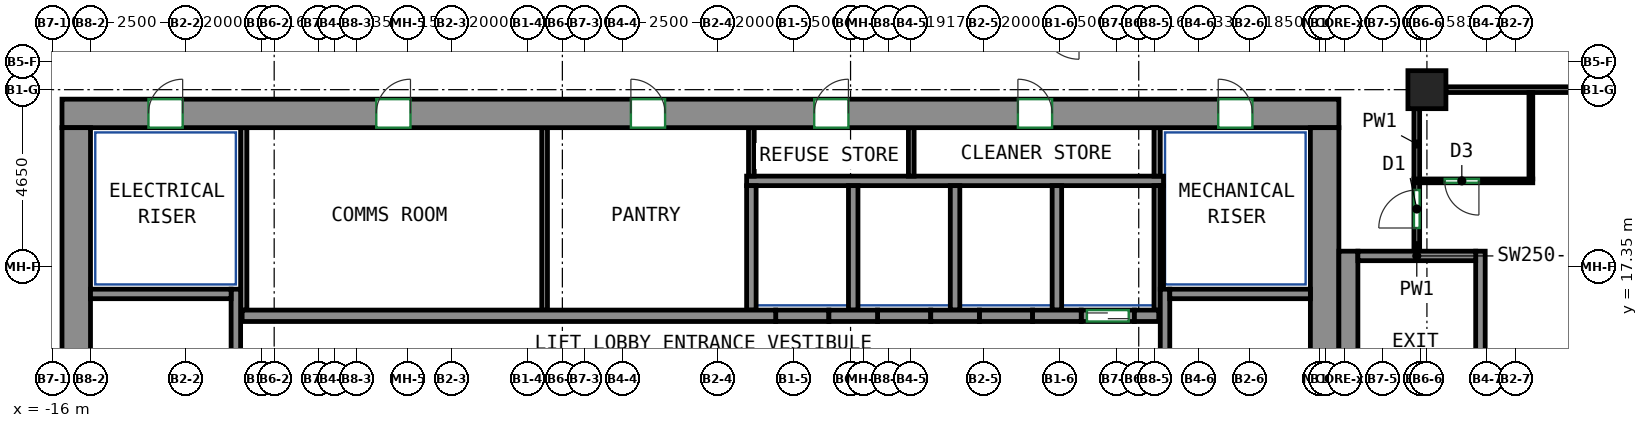
"""IFC4 building model, lengths in metres.
Left out: names, types, materials, properties, quantities, classifications, styles, units other than length and angle.
Written with IfcOpenShell. Run it as: python <this file> out.ifc"""

import sys

from ifc_helpers import new_model, si_unit, direction, frame, frame_2d, origin, origin_2d, place, context, subcontext, project, spatial, rectangle, extrude, source, transform, mapped, element, fill, save


model = new_model("IFC4")
c1 = context("Model", 3, precision=1e-05, world=origin(), true_north=direction((0.0, 1.0)))
c2 = subcontext(c1, "Body", "Model", "MODEL_VIEW")
j1 = project(units=[si_unit("LENGTHUNIT", "METRE"), si_unit("PLANEANGLEUNIT", "RADIAN")], contexts=[c1])
p1 = place(None, origin())
s1 = spatial("IfcSite", under=j1, at=p1, CompositionType="ELEMENT")
p2 = place(p1, origin())
s2 = spatial("IfcBuilding", under=s1, at=p2, CompositionType="ELEMENT")
p3 = place(p2, frame((0.0, 0.0, 210.1)))
s3 = spatial("IfcBuildingStorey", under=s2, at=p3, CompositionType="ELEMENT", Elevation=210.1)
m1 = source(origin(), c2, "Body", "SweptSolid", [
    extrude(rectangle(XDim=1.0, YDim=1.0, at=origin_2d()), origin(), (0.0, 0.0, 1.0), 3.12),
])
p4 = place(p3, frame((20.167, 22.0, 0.0), z_axis=(0.0, 0.0, 1.0), x_axis=(1.0, 0.0, 0.0)))
e1 = element("IfcColumn", 1, at=p4, inside=s3, PredefinedType="COLUMN", context=c2, shape_type="MappedRepresentation", body=[
    mapped(m1, transform((0.0, 0.0, 0.0))),
])
m2 = source(origin(), c2, "Body", "SweptSolid", [
    extrude(rectangle(XDim=33.6, YDim=0.75, at=frame_2d((16.8, 0.0))), origin(), (0.0, 0.0, 1.0), 3.12),
])
p5 = place(p3, frame((-15.75, 21.375, 0.0), z_axis=(0.0, 0.0, 1.0), x_axis=(1.0, 0.0, 0.0)))
e2 = element("IfcWall", 2, at=p5, inside=s3, PredefinedType="SHEAR", context=c2, shape_type="MappedRepresentation", body=[
    mapped(m2, transform((0.0, 0.0, 0.0))),
])
p6 = place(p5, frame((8.27, 0.0, 0.0)))
e3 = element("IfcOpeningElement", 3, at=p6, cuts=e2, PredefinedType="OPENING", context=c2, shape_type="SweptSolid", body=[
    extrude(rectangle(XDim=0.9, YDim=2.1, at=frame_2d((0.45, 1.05))), frame((0.0, 0.385, 0.0), z_axis=(0.0, -1.0, 0.0), x_axis=(1.0, 0.0, 0.0)), (0.0, 0.0, 1.0), 0.77),
])
p7 = place(p5, frame((14.97, 0.0, 0.0)))
e4 = element("IfcOpeningElement", 4, at=p7, cuts=e2, PredefinedType="OPENING", context=c2, shape_type="SweptSolid", body=[
    extrude(rectangle(XDim=0.9, YDim=2.1, at=frame_2d((0.45, 1.05))), frame((0.0, 0.385, 0.0), z_axis=(0.0, -1.0, 0.0), x_axis=(1.0, 0.0, 0.0)), (0.0, 0.0, 1.0), 0.77),
])
p8 = place(p5, frame((19.794, 0.0, 0.0)))
e5 = element("IfcOpeningElement", 5, at=p8, cuts=e2, PredefinedType="OPENING", context=c2, shape_type="SweptSolid", body=[
    extrude(rectangle(XDim=0.9, YDim=2.1, at=frame_2d((0.45, 1.05))), frame((0.0, 0.385, 0.0), z_axis=(0.0, -1.0, 0.0), x_axis=(1.0, 0.0, 0.0)), (0.0, 0.0, 1.0), 0.77),
])
p9 = place(p5, frame((25.154, 0.0, 0.0)))
e6 = element("IfcOpeningElement", 6, at=p9, cuts=e2, PredefinedType="OPENING", context=c2, shape_type="SweptSolid", body=[
    extrude(rectangle(XDim=0.9, YDim=2.1, at=frame_2d((0.45, 1.05))), frame((0.0, 0.385, 0.0), z_axis=(0.0, -1.0, 0.0), x_axis=(1.0, 0.0, 0.0)), (0.0, 0.0, 1.0), 0.77),
])
p10 = place(p5, frame((2.275, 0.0, 0.0)))
e7 = element("IfcOpeningElement", 7, at=p10, cuts=e2, PredefinedType="OPENING", context=c2, shape_type="SweptSolid", body=[
    extrude(rectangle(XDim=0.9, YDim=2.1, at=frame_2d((0.45, 1.05))), frame((0.0, 0.385, 0.0), z_axis=(0.0, -1.0, 0.0), x_axis=(1.0, 0.0, 0.0)), (0.0, 0.0, 1.0), 0.77),
])
p11 = place(p5, frame((30.425, 0.0, 0.0)))
e8 = element("IfcOpeningElement", 8, at=p11, cuts=e2, PredefinedType="OPENING", context=c2, shape_type="SweptSolid", body=[
    extrude(rectangle(XDim=0.9, YDim=2.1, at=frame_2d((0.45, 1.05))), frame((0.0, 0.385, 0.0), z_axis=(0.0, -1.0, 0.0), x_axis=(1.0, 0.0, 0.0)), (0.0, 0.0, 1.0), 0.77),
])
m3 = source(origin(), c2, "Body", "SweptSolid", [
    extrude(rectangle(XDim=12.0, YDim=0.75, at=frame_2d((6.0, 0.0))), origin(), (0.0, 0.0, 1.0), 3.12),
])
for number, where, z_axis, x_axis in (
    (9, (-15.375, 9.0, 0.0), (0.0, 0.0, 1.0), (0.0, 1.0, 0.0)),
    (10, (17.475, 9.0, 0.0), (0.0, 0.0, 1.0), (0.0, 1.0, 0.0)),
):
    element("IfcWall", number, at=place(p3, frame(where, z_axis=z_axis, x_axis=x_axis)), inside=s3, PredefinedType="SHEAR", context=c2, shape_type="MappedRepresentation", body=[
        mapped(m3, transform((0.0, 0.0, 0.0))),
    ])
m4 = source(origin(), c2, "Body", "SweptSolid", [
    extrude(rectangle(XDim=7.75, YDim=0.25, at=frame_2d((3.875, 0.0))), origin(), (0.0, 0.0, 1.0), 3.12),
])
p12 = place(p3, frame((-11.175, 9.0, 0.0), z_axis=(0.0, 0.0, 1.0), x_axis=(0.0, 1.0, 0.0)))
e11 = element("IfcWall", 11, at=p12, inside=s3, PredefinedType="SHEAR", context=c2, shape_type="MappedRepresentation", body=[
    mapped(m4, transform((0.0, 0.0, 0.0))),
])
m5 = source(origin(), c2, "Body", "SweptSolid", [
    extrude(rectangle(XDim=3.7, YDim=0.25, at=frame_2d((1.85, 0.0))), origin(), (0.0, 0.0, 1.0), 3.12),
])
p13 = place(p3, frame((-15.0, 16.625, 0.0), z_axis=(0.0, 0.0, 1.0), x_axis=(1.0, 0.0, 0.0)))
e12 = element("IfcWall", 12, at=p13, inside=s3, PredefinedType="SHEAR", context=c2, shape_type="MappedRepresentation", body=[
    mapped(m5, transform((0.0, 0.0, 0.0))),
])
p14 = place(p3, frame((13.275, 9.0, 0.0), z_axis=(0.0, 0.0, 1.0), x_axis=(0.0, 1.0, 0.0)))
e13 = element("IfcWall", 13, at=p14, inside=s3, PredefinedType="SHEAR", context=c2, shape_type="MappedRepresentation", body=[
    mapped(m4, transform((0.0, 0.0, 0.0))),
])
m6 = source(origin(), c2, "Body", "SweptSolid", [
    extrude(rectangle(XDim=3.7, YDim=0.25, at=frame_2d((1.85, 0.0))), origin(), (0.0, 0.0, 1.0), 3.12),
])
p15 = place(p3, frame((13.4, 16.625, 0.0), z_axis=(0.0, 0.0, 1.0), x_axis=(1.0, 0.0, 0.0)))
e14 = element("IfcWall", 14, at=p15, inside=s3, PredefinedType="SHEAR", context=c2, shape_type="MappedRepresentation", body=[
    mapped(m6, transform((0.0, 0.0, 0.0))),
])
m7 = source(origin(), c2, "Body", "SweptSolid", [
    extrude(rectangle(XDim=8.0, YDim=0.5, at=frame_2d((4.0, 0.0))), origin(), (0.0, 0.0, 1.0), 3.12),
])
p16 = place(p3, frame((18.1, 9.75, 0.0), z_axis=(0.0, 0.0, 1.0), x_axis=(0.0, 1.0, 0.0)))
e15 = element("IfcWall", 15, at=p16, inside=s3, PredefinedType="SHEAR", context=c2, shape_type="MappedRepresentation", body=[
    mapped(m7, transform((0.0, 0.0, 0.0))),
])
m8 = source(origin(), c2, "Body", "SweptSolid", [
    extrude(rectangle(XDim=8.0, YDim=0.25, at=frame_2d((4.0, 0.0))), origin(), (0.0, 0.0, 1.0), 3.12),
])
p17 = place(p3, frame((21.575, 9.75, 0.0), z_axis=(0.0, 0.0, 1.0), x_axis=(0.0, 1.0, 0.0)))
e16 = element("IfcWall", 16, at=p17, inside=s3, PredefinedType="SHEAR", context=c2, shape_type="MappedRepresentation", body=[
    mapped(m8, transform((0.0, 0.0, 0.0))),
])
m9 = source(origin(), c2, "Body", "SweptSolid", [
    extrude(rectangle(XDim=3.1, YDim=0.25, at=frame_2d((1.55, 0.0))), origin(), (0.0, 0.0, 1.0), 3.12),
])
p18 = place(p3, frame((18.35, 17.625, 0.0), z_axis=(0.0, 0.0, 1.0), x_axis=(1.0, 0.0, 0.0)))
e17 = element("IfcWall", 17, at=p18, inside=s3, PredefinedType="SHEAR", context=c2, shape_type="MappedRepresentation", body=[
    mapped(m9, transform((0.0, 0.0, 0.0))),
])
m10 = source(origin(), c2, "Body", "SweptSolid", [
    extrude(rectangle(XDim=14.04, YDim=0.3, at=frame_2d((7.02, 0.0))), origin(), (0.0, 0.0, 1.0), 3.12),
])
p19 = place(p3, frame((-11.01, 16.05, 0.0), z_axis=(0.0, 0.0, 1.0), x_axis=(1.0, 0.0, 0.0)))
e18 = element("IfcWall", 18, at=p19, inside=s3, PredefinedType="SHEAR", context=c2, shape_type="MappedRepresentation", body=[
    mapped(m10, transform((0.0, 0.0, 0.0))),
])
m11 = source(origin(), c2, "Body", "SweptSolid", [
    extrude(rectangle(XDim=1.28, YDim=0.3, at=frame_2d((0.64, 0.0))), origin(), (0.0, 0.0, 1.0), 3.12),
])
p20 = place(p3, frame((4.43, 16.05, 0.0), z_axis=(0.0, 0.0, 1.0), x_axis=(1.0, 0.0, 0.0)))
e19 = element("IfcWall", 19, at=p20, inside=s3, PredefinedType="SHEAR", context=c2, shape_type="MappedRepresentation", body=[
    mapped(m11, transform((0.0, 0.0, 0.0))),
])
m12 = source(origin(), c2, "Body", "SweptSolid", [
    extrude(rectangle(XDim=1.28, YDim=0.3, at=frame_2d((0.64, 0.0))), origin(), (0.0, 0.0, 1.0), 3.12),
])
p21 = place(p3, frame((7.11, 16.05, 0.0), z_axis=(0.0, 0.0, 1.0), x_axis=(1.0, 0.0, 0.0)))
e20 = element("IfcWall", 20, at=p21, inside=s3, PredefinedType="SHEAR", context=c2, shape_type="MappedRepresentation", body=[
    mapped(m12, transform((0.0, 0.0, 0.0))),
])
p22 = place(p3, frame((9.79, 16.05, 0.0), z_axis=(0.0, 0.0, 1.0), x_axis=(1.0, 0.0, 0.0)))
e21 = element("IfcWall", 21, at=p22, inside=s3, PredefinedType="SHEAR", context=c2, shape_type="MappedRepresentation", body=[
    mapped(m11, transform((0.0, 0.0, 0.0))),
])
m13 = source(origin(), c2, "Body", "SweptSolid", [
    extrude(rectangle(XDim=0.64, YDim=0.3, at=frame_2d((0.32, 0.0))), origin(), (0.0, 0.0, 1.0), 3.12),
])
p23 = place(p3, frame((12.47, 16.05, 0.0), z_axis=(0.0, 0.0, 1.0), x_axis=(1.0, 0.0, 0.0)))
e22 = element("IfcWall", 22, at=p23, inside=s3, PredefinedType="SHEAR", context=c2, shape_type="MappedRepresentation", body=[
    mapped(m13, transform((0.0, 0.0, 0.0))),
])
m14 = source(origin(), c2, "Body", "SweptSolid", [
    extrude(rectangle(XDim=1.4, YDim=0.3, at=frame_2d((0.7, 0.0))), origin(), (0.0, 0.0, 1.0), 3.12),
])
p24 = place(p3, frame((11.07, 16.05, 0.0), z_axis=(0.0, 0.0, 1.0), x_axis=(1.0, 0.0, 0.0)))
e23 = element("IfcWall", 23, at=p24, inside=s3, PredefinedType="PARTITIONING", context=c2, shape_type="MappedRepresentation", body=[
    mapped(m14, transform((0.0, 0.0, 0.0))),
])
p25 = place(p24, frame((0.15, 0.0, 0.0)))
e24 = element("IfcOpeningElement", 24, at=p25, cuts=e23, PredefinedType="OPENING", context=c2, shape_type="SweptSolid", body=[
    extrude(rectangle(XDim=1.1, YDim=2.1, at=frame_2d((0.55, 1.05))), frame((0.0, 0.16, 0.0), z_axis=(0.0, -1.0, 0.0), x_axis=(1.0, 0.0, 0.0)), (0.0, 0.0, 1.0), 0.32),
])
p26 = place(p3, frame((3.03, 16.05, 0.0), z_axis=(0.0, 0.0, 1.0), x_axis=(1.0, 0.0, 0.0)))
e25 = element("IfcWall", 25, at=p26, inside=s3, PredefinedType="PARTITIONING", context=c2, shape_type="MappedRepresentation", body=[
    mapped(m14, transform((0.0, 0.0, 0.0))),
])
m15 = source(origin(), c2, "Body", "SweptSolid", [
    extrude(rectangle(XDim=1.4, YDim=0.3, at=frame_2d((0.7, 0.0))), origin(), (0.0, 0.0, 1.0), 3.12),
])
for number, where, z_axis, x_axis in (
    (26, (5.71, 16.05, 0.0), (0.0, 0.0, 1.0), (1.0, 0.0, 0.0)),
    (27, (8.39, 16.05, 0.0), (0.0, 0.0, 1.0), (1.0, 0.0, 0.0)),
):
    element("IfcWall", number, at=place(p3, frame(where, z_axis=z_axis, x_axis=x_axis)), inside=s3, PredefinedType="PARTITIONING", context=c2, shape_type="MappedRepresentation", body=[
        mapped(m15, transform((0.0, 0.0, 0.0))),
    ])
m16 = source(origin(), c2, "Body", "SweptSolid", [
    extrude(rectangle(XDim=10.97, YDim=0.25, at=frame_2d((5.485, 0.0))), origin(), (0.0, 0.0, 1.0), 3.12),
])
p27 = place(p3, frame((2.265, 19.6, 0.0), z_axis=(0.0, 0.0, 1.0), x_axis=(1.0, 0.0, 0.0)))
e28 = element("IfcWall", 28, at=p27, inside=s3, PredefinedType="PARTITIONING", context=c2, shape_type="MappedRepresentation", body=[
    mapped(m16, transform((0.0, 0.0, 0.0))),
])
m17 = source(origin(), c2, "Body", "SweptSolid", [
    extrude(rectangle(XDim=3.275, YDim=0.165, at=frame_2d((1.638, 0.0))), origin(), (0.0, 0.0, 1.0), 3.12),
])
p28 = place(p3, frame((13.067, 16.2, 0.0), z_axis=(0.0, 0.0, 1.0), x_axis=(0.0, 1.0, 0.0)))
e29 = element("IfcWall", 29, at=p28, inside=s3, PredefinedType="PARTITIONING", context=c2, shape_type="MappedRepresentation", body=[
    mapped(m17, transform((0.0, 0.0, 0.0))),
])
m18 = source(origin(), c2, "Body", "SweptSolid", [
    extrude(rectangle(XDim=1.275, YDim=0.165, at=frame_2d((0.637, 0.0))), origin(), (0.0, 0.0, 1.0), 3.12),
])
p29 = place(p3, frame((13.067, 19.725, 0.0), z_axis=(0.0, 0.0, 1.0), x_axis=(0.0, 1.0, 0.0)))
e30 = element("IfcWall", 30, at=p29, inside=s3, PredefinedType="PARTITIONING", context=c2, shape_type="MappedRepresentation", body=[
    mapped(m18, transform((0.0, 0.0, 0.0))),
])
m19 = source(origin(), c2, "Body", "SweptSolid", [
    extrude(rectangle(XDim=4.8, YDim=0.165, at=frame_2d((2.4, 0.0))), origin(), (0.0, 0.0, 1.0), 3.12),
])
p30 = place(p3, frame((-10.968, 16.2, 0.0), z_axis=(0.0, 0.0, 1.0), x_axis=(0.0, 1.0, 0.0)))
e31 = element("IfcWall", 31, at=p30, inside=s3, PredefinedType="PARTITIONING", context=c2, shape_type="MappedRepresentation", body=[
    mapped(m19, transform((0.0, 0.0, 0.0))),
])
m20 = source(origin(), c2, "Body", "SweptSolid", [
    extrude(rectangle(XDim=3.275, YDim=0.25, at=frame_2d((1.638, 0.0))), origin(), (0.0, 0.0, 1.0), 3.12),
])
p31 = place(p3, frame((10.43, 16.2, 0.0), z_axis=(0.0, 0.0, 1.0), x_axis=(0.0, 1.0, 0.0)))
e32 = element("IfcWall", 32, at=p31, inside=s3, PredefinedType="PARTITIONING", context=c2, shape_type="MappedRepresentation", body=[
    mapped(m20, transform((0.0, 0.0, 0.0))),
])
m21 = source(origin(), c2, "Body", "SweptSolid", [
    extrude(rectangle(XDim=2.725, YDim=0.085, at=frame_2d((1.363, 0.0))), origin(), (0.0, 0.0, 1.0), 3.12),
])
p32 = place(p3, frame((13.192, 16.75, 0.0), z_axis=(0.0, 0.0, 1.0), x_axis=(0.0, 1.0, 0.0)))
e33 = element("IfcWall", 33, at=p32, inside=s3, PredefinedType="PARTITIONING", context=c2, shape_type="MappedRepresentation", body=[
    mapped(m21, transform((0.0, 0.0, 0.0))),
])
for number, where, z_axis, x_axis in (
    (34, (2.39, 16.2, 0.0), (0.0, 0.0, 1.0), (0.0, 1.0, 0.0)),
    (35, (5.07, 16.2, 0.0), (0.0, 0.0, 1.0), (0.0, 1.0, 0.0)),
    (36, (7.75, 16.2, 0.0), (0.0, 0.0, 1.0), (0.0, 1.0, 0.0)),
):
    element("IfcWall", number, at=place(p3, frame(where, z_axis=z_axis, x_axis=x_axis)), inside=s3, PredefinedType="PARTITIONING", context=c2, shape_type="MappedRepresentation", body=[
        mapped(m20, transform((0.0, 0.0, 0.0))),
    ])
m22 = source(origin(), c2, "Body", "SweptSolid", [
    extrude(rectangle(XDim=4.8, YDim=0.15, at=frame_2d((2.4, 0.0))), origin(), (0.0, 0.0, 1.0), 3.12),
])
p33 = place(p3, frame((-3.05, 16.2, 0.0), z_axis=(0.0, 0.0, 1.0), x_axis=(0.0, 1.0, 0.0)))
e37 = element("IfcWall", 37, at=p33, inside=s3, PredefinedType="PARTITIONING", context=c2, shape_type="MappedRepresentation", body=[
    mapped(m22, transform((0.0, 0.0, 0.0))),
])
m23 = source(origin(), c2, "Body", "SweptSolid", [
    extrude(rectangle(XDim=1.275, YDim=0.15, at=frame_2d((0.637, 0.0))), origin(), (0.0, 0.0, 1.0), 3.12),
])
for number, where, z_axis, x_axis in (
    (38, (2.39, 19.725, 0.0), (0.0, 0.0, 1.0), (0.0, 1.0, 0.0)),
    (39, (6.598, 19.725, 0.0), (0.0, 0.0, 1.0), (0.0, 1.0, 0.0)),
):
    element("IfcWall", number, at=place(p3, frame(where, z_axis=z_axis, x_axis=x_axis)), inside=s3, PredefinedType="PARTITIONING", context=c2, shape_type="MappedRepresentation", body=[
        mapped(m23, transform((0.0, 0.0, 0.0))),
    ])
p34 = place(p3, frame((19.9, 17.75, 0.0), z_axis=(0.0, 0.0, 1.0), x_axis=(0.0, 1.0, 0.0)))
e40 = element("IfcWall", 40, at=p34, inside=s3, PredefinedType="PARTITIONING", context=c2, shape_type="SweptSolid", body=[
    extrude(rectangle(XDim=1.81, YDim=0.15, at=frame_2d((0.905, 0.0))), origin(), (0.0, 0.0, 1.0), 3.12),
])
p35 = place(p34, frame((0.61, 0.0, 0.0)))
e41 = element("IfcOpeningElement", 41, at=p35, cuts=e40, PredefinedType="OPENING", context=c2, shape_type="SweptSolid", body=[
    extrude(rectangle(XDim=1.0, YDim=2.1, at=frame_2d((0.5, 1.05))), frame((0.0, 0.085, 0.0), z_axis=(0.0, -1.0, 0.0), x_axis=(1.0, 0.0, 0.0)), (0.0, 0.0, 1.0), 0.17),
])
p36 = place(p3, frame((20.667, 22.0, 0.0), z_axis=(0.0, 0.0, 1.0), x_axis=(1.0, 0.0, 0.0)))
e42 = element("IfcWall", 42, at=p36, inside=s3, PredefinedType="PARTITIONING", context=c2, shape_type="SweptSolid", body=[
    extrude(rectangle(XDim=7.158, YDim=0.15, at=frame_2d((3.579, 0.0))), origin(), (0.0, 0.0, 1.0), 3.12),
])
p37 = place(p3, frame((19.9, 19.64, 0.0), z_axis=(0.0, 0.0, 1.0), x_axis=(0.0, 1.0, 0.0)))
e43 = element("IfcWall", 43, at=p37, inside=s3, PredefinedType="PARTITIONING", context=c2, shape_type="SweptSolid", body=[
    extrude(rectangle(XDim=1.86, YDim=0.15, at=frame_2d((0.93, 0.0))), origin(), (0.0, 0.0, 1.0), 3.12),
])
p38 = place(p3, frame((22.952, 19.6, 0.0), z_axis=(0.0, 0.0, 1.0), x_axis=(-1.0, 0.0, 0.0)))
e44 = element("IfcWall", 44, at=p38, inside=s3, PredefinedType="PARTITIONING", context=c2, shape_type="SweptSolid", body=[
    extrude(rectangle(XDim=3.125, YDim=0.1, at=frame_2d((1.562, 0.0))), origin(), (0.0, 0.0, 1.0), 3.12),
])
p39 = place(p38, frame((1.417, 0.0, 0.0)))
e45 = element("IfcOpeningElement", 45, at=p39, cuts=e44, PredefinedType="OPENING", context=c2, shape_type="SweptSolid", body=[
    extrude(rectangle(XDim=0.9, YDim=2.1, at=frame_2d((0.45, 1.05))), frame((0.0, 0.06, 0.0), z_axis=(0.0, -1.0, 0.0), x_axis=(1.0, 0.0, 0.0)), (0.0, 0.0, 1.0), 0.12),
])
p40 = place(p3, frame((22.902, 19.65, 0.0), z_axis=(0.0, 0.0, 1.0), x_axis=(0.0, 1.0, 0.0)))
e46 = element("IfcWall", 46, at=p40, inside=s3, PredefinedType="PARTITIONING", context=c2, shape_type="SweptSolid", body=[
    extrude(rectangle(XDim=2.273, YDim=0.1, at=frame_2d((1.137, 0.0))), origin(), (0.0, 0.0, 1.0), 3.12),
])
p41 = place(p25, origin())
e47 = element("IfcDoor", 47, at=p41, inside=s3, OperationType="DOUBLE_DOOR_SLIDING", PredefinedType="DOOR", context=c2, shape_type="SweptSolid", body=[
    extrude(rectangle(XDim=1.1, YDim=2.1, at=frame_2d((0.55, 1.05))), frame((0.0, 0.025, 0.0), z_axis=(0.0, -1.0, 0.0), x_axis=(1.0, 0.0, 0.0)), (0.0, 0.0, 1.0), 0.05),
])
fill(e24, e47)
p42 = place(p6, origin())
e48 = element("IfcDoor", 48, at=p42, inside=s3, OperationType="SINGLE_SWING_RIGHT", PredefinedType="DOOR", context=c2, shape_type="SweptSolid", body=[
    extrude(rectangle(XDim=0.9, YDim=2.1, at=frame_2d((0.45, 1.05))), frame((0.0, -0.23, 0.0), z_axis=(0.0, -1.0, 0.0), x_axis=(1.0, 0.0, 0.0)), (0.0, 0.0, 1.0), 0.05),
])
fill(e3, e48)
p43 = place(p7, origin())
e49 = element("IfcDoor", 49, at=p43, inside=s3, OperationType="SINGLE_SWING_LEFT", PredefinedType="DOOR", context=c2, shape_type="SweptSolid", body=[
    extrude(rectangle(XDim=0.9, YDim=2.1, at=frame_2d((0.45, 1.05))), frame((0.0, -0.23, 0.0), z_axis=(0.0, -1.0, 0.0), x_axis=(1.0, 0.0, 0.0)), (0.0, 0.0, 1.0), 0.05),
])
fill(e4, e49)
p44 = place(p8, origin())
e50 = element("IfcDoor", 50, at=p44, inside=s3, OperationType="SINGLE_SWING_RIGHT", PredefinedType="DOOR", context=c2, shape_type="SweptSolid", body=[
    extrude(rectangle(XDim=0.9, YDim=2.1, at=frame_2d((0.45, 1.05))), frame((0.0, -0.23, 0.0), z_axis=(0.0, -1.0, 0.0), x_axis=(1.0, 0.0, 0.0)), (0.0, 0.0, 1.0), 0.05),
])
fill(e5, e50)
p45 = place(p9, origin())
e51 = element("IfcDoor", 51, at=p45, inside=s3, OperationType="SINGLE_SWING_LEFT", PredefinedType="DOOR", context=c2, shape_type="SweptSolid", body=[
    extrude(rectangle(XDim=0.9, YDim=2.1, at=frame_2d((0.45, 1.05))), frame((0.0, -0.23, 0.0), z_axis=(0.0, -1.0, 0.0), x_axis=(1.0, 0.0, 0.0)), (0.0, 0.0, 1.0), 0.05),
])
fill(e6, e51)
p46 = place(p10, origin())
e52 = element("IfcDoor", 52, at=p46, inside=s3, OperationType="SINGLE_SWING_RIGHT", PredefinedType="DOOR", context=c2, shape_type="SweptSolid", body=[
    extrude(rectangle(XDim=0.9, YDim=2.1, at=frame_2d((0.45, 1.05))), frame((0.0, -0.23, 0.0), z_axis=(0.0, -1.0, 0.0), x_axis=(1.0, 0.0, 0.0)), (0.0, 0.0, 1.0), 0.05),
])
fill(e7, e52)
p47 = place(p11, origin())
e53 = element("IfcDoor", 53, at=p47, inside=s3, OperationType="SINGLE_SWING_LEFT", PredefinedType="DOOR", context=c2, shape_type="SweptSolid", body=[
    extrude(rectangle(XDim=0.9, YDim=2.1, at=frame_2d((0.45, 1.05))), frame((0.0, -0.23, 0.0), z_axis=(0.0, -1.0, 0.0), x_axis=(1.0, 0.0, 0.0)), (0.0, 0.0, 1.0), 0.05),
])
fill(e8, e53)
p48 = place(p35, origin())
e54 = element("IfcDoor", 54, at=p48, inside=s3, OperationType="SINGLE_SWING_LEFT", PredefinedType="DOOR", context=c2, shape_type="SweptSolid", body=[
    extrude(rectangle(XDim=1.0, YDim=2.1, at=frame_2d((0.5, 1.05))), frame((0.0, 0.025, 0.0), z_axis=(0.0, -1.0, 0.0), x_axis=(1.0, 0.0, 0.0)), (0.0, 0.0, 1.0), 0.05),
])
fill(e41, e54)
p49 = place(p39, origin())
e55 = element("IfcDoor", 55, at=p49, inside=s3, OperationType="SINGLE_SWING_LEFT", PredefinedType="DOOR", context=c2, shape_type="SweptSolid", body=[
    extrude(rectangle(XDim=0.9, YDim=2.1, at=frame_2d((0.45, 1.05))), frame((0.0, 0.025, 0.0), z_axis=(0.0, -1.0, 0.0), x_axis=(1.0, 0.0, 0.0)), (0.0, 0.0, 1.0), 0.05),
])
fill(e45, e55)
save(model, sys.argv[1])
